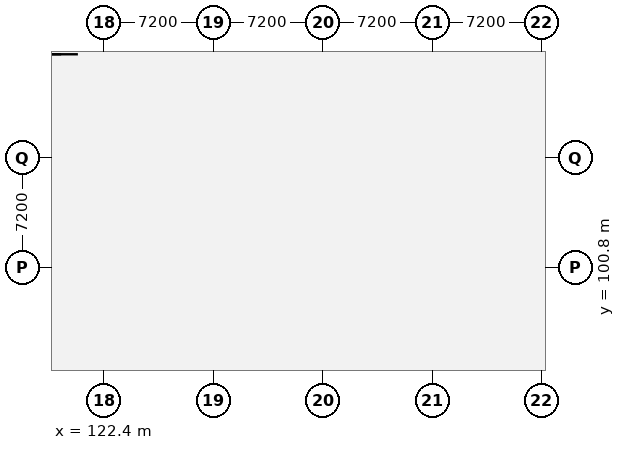
"""IFC4 building model, lengths in metres.
Left out: names, types, materials, properties, quantities, classifications, styles, units other than length and angle.
Written with IfcOpenShell. Run it as: python <this file> out.ifc"""

import sys

from ifc_helpers import new_model, si_unit, direction, frame, frame_2d, origin, place, context, subcontext, project, spatial, rectangle, extrude, element, fill, save


model = new_model("IFC4")
c1 = context("Model", 3, precision=1e-05, world=origin(), true_north=direction((0.0, 1.0)))
c2 = subcontext(c1, "Body", "Model", "MODEL_VIEW")
j1 = project(units=[si_unit("LENGTHUNIT", "METRE"), si_unit("PLANEANGLEUNIT", "RADIAN")], contexts=[c1])
p1 = place(None, origin())
s1 = spatial("IfcSite", under=j1, at=p1, CompositionType="ELEMENT")
p2 = place(p1, origin())
s2 = spatial("IfcBuilding", under=s1, at=p2, CompositionType="ELEMENT")
p3 = place(p2, origin())
s3 = spatial("IfcBuildingStorey", under=s2, at=p3, CompositionType="ELEMENT", Elevation=0.0)
p4 = place(p3, frame((111.8, 114.8, 0.0), z_axis=(0.0, 0.0, 1.0), x_axis=(1.0, 0.0, 0.0)))
e1 = element("IfcWall", 1, at=p4, inside=s3, PredefinedType="STANDARD", context=c2, shape_type="SweptSolid", body=[
    extrude(rectangle(XDim=8.9, YDim=0.3, at=frame_2d((4.45, 0.0))), origin(), (0.0, 0.0, 1.0), 3.55),
])
p5 = place(p4, frame((1.2, 0.0, 0.0)))
e2 = element("IfcOpeningElement", 2, at=p5, cuts=e1, PredefinedType="OPENING", context=c2, shape_type="SweptSolid", body=[
    extrude(rectangle(XDim=6.5, YDim=2.15, at=frame_2d((3.25, 1.075))), frame((0.0, 0.162, 0.0), z_axis=(0.0, -1.0, 0.0), x_axis=(1.0, 0.0, 0.0)), (0.0, 0.0, 1.0), 0.324),
])
p6 = place(p5, frame((6.5, 0.0, 0.0), z_axis=(0.0, 0.0, 1.0), x_axis=(-1.0, 0.0, 0.0)))
e3 = element("IfcDoor", 3, at=p6, inside=s3, OperationType="DOUBLE_SWING_LEFT", PredefinedType="DOOR", context=c2, shape_type="SweptSolid", body=[
    extrude(rectangle(XDim=6.5, YDim=2.15, at=frame_2d((3.25, 1.075))), frame((0.0, 0.025, 0.0), z_axis=(0.0, -1.0, 0.0), x_axis=(1.0, 0.0, 0.0)), (0.0, 0.0, 1.0), 0.05),
])
fill(e2, e3)
save(model, sys.argv[1])
